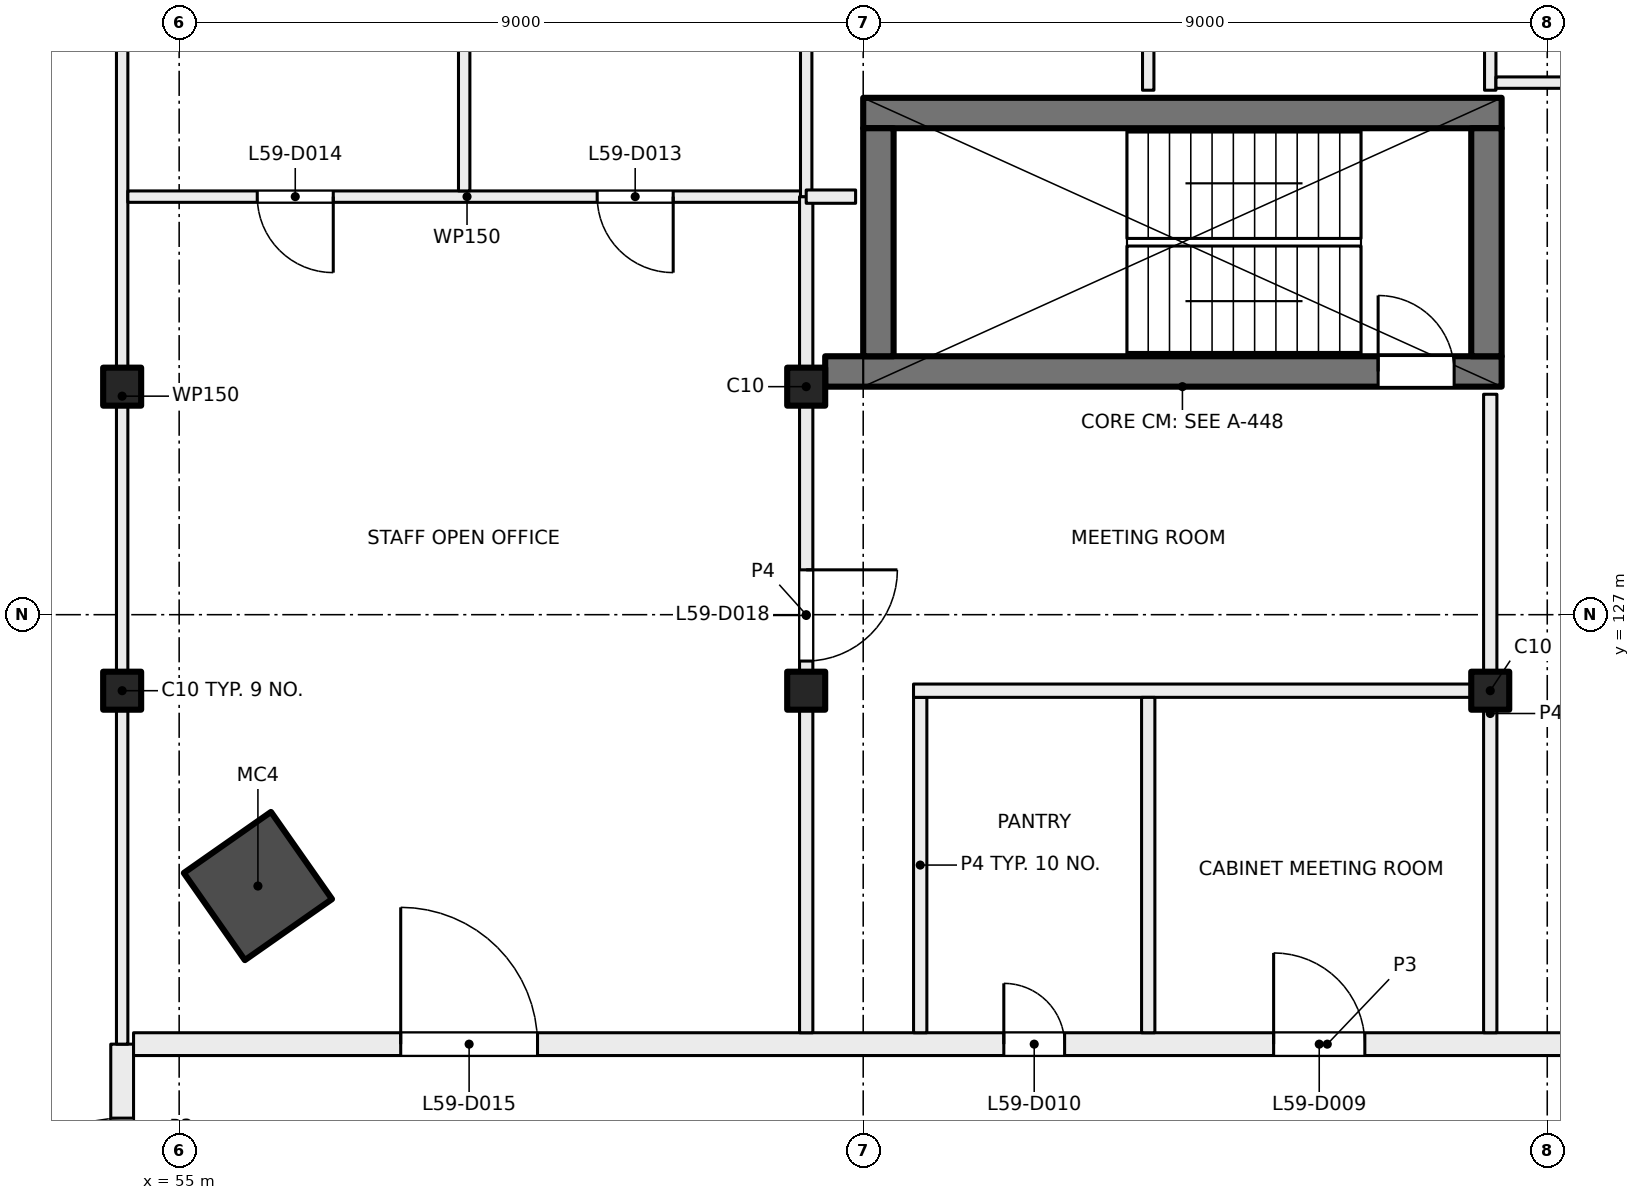
"""IFC4 building model, lengths in metres.
Left out: names, types, materials, properties, quantities, classifications, styles, units other than length and angle.
Written with IfcOpenShell. Run it as: python <this file> out.ifc"""

import sys

from ifc_helpers import new_model, si_unit, direction, frame, frame_2d, origin, origin_2d, place, context, subcontext, project, spatial, rectangle, hollow_rectangle, extrude, element, fill, save


model = new_model("IFC4")
c1 = context("Model", 3, precision=1e-05, world=origin(), true_north=direction((0.0, 1.0)))
c2 = subcontext(c1, "Body", "Model", "MODEL_VIEW")
j1 = project(units=[si_unit("LENGTHUNIT", "METRE"), si_unit("PLANEANGLEUNIT", "RADIAN")], contexts=[c1])
p1 = place(None, origin())
s1 = spatial("IfcSite", under=j1, at=p1, CompositionType="ELEMENT")
p2 = place(p1, origin())
s2 = spatial("IfcBuilding", under=s1, at=p2, CompositionType="ELEMENT")
p3 = place(p2, frame((0.0, 0.0, 249.5)))
s3 = spatial("IfcBuildingStorey", under=s2, at=p3, CompositionType="ELEMENT", Elevation=249.5)
p4 = place(p3, frame((56.036, 123.43, 0.0), z_axis=(0.0, 0.0, 1.0), x_axis=(0.573576436351, -0.819152044289, 0.0)))
e1 = element("IfcColumn", 1, at=p4, inside=s3, PredefinedType="COLUMN", context=c2, shape_type="SweptSolid", body=[
    extrude(hollow_rectangle(XDim=1.4, YDim=1.4, WallThickness=0.025, at=origin_2d()), origin(), (0.0, 0.0, 1.0), 4.0),
])
for number, where, z_axis, x_axis in (
    (2, (54.25, 130.0, 0.0), (0.0, 0.0, 1.0), (1.0, 0.0, 0.0)),
    (3, (63.25, 130.0, 0.0), (0.0, 0.0, 1.0), (1.0, 0.0, 0.0)),
    (4, (54.25, 126.0, 0.0), (0.0, 0.0, 1.0), (1.0, 0.0, 0.0)),
    (5, (63.25, 126.0, 0.0), (0.0, 0.0, 1.0), (1.0, 0.0, 0.0)),
    (6, (72.25, 126.0, 0.0), (0.0, 0.0, 1.0), (1.0, 0.0, 0.0)),
):
    element("IfcColumn", number, at=place(p3, frame(where, z_axis=z_axis, x_axis=x_axis)), inside=s3, PredefinedType="COLUMN", context=c2, shape_type="SweptSolid", body=[
        extrude(rectangle(XDim=0.5, YDim=0.5, at=origin_2d()), origin(), (0.0, 0.0, 1.0), 4.0),
    ])
p5 = place(p3, frame((63.5, 130.2, 0.0), z_axis=(0.0, 0.0, 1.0), x_axis=(1.0, 0.0, 0.0)))
e7 = element("IfcWall", 7, at=p5, inside=s3, PredefinedType="SHEAR", context=c2, shape_type="SweptSolid", body=[
    extrude(rectangle(XDim=8.9, YDim=0.4, at=frame_2d((4.45, 0.0))), origin(), (0.0, 0.0, 1.0), 4.0),
])
p6 = place(p5, frame((7.275, 0.0, 0.0)))
e8 = element("IfcOpeningElement", 8, at=p6, cuts=e7, PredefinedType="OPENING", context=c2, shape_type="SweptSolid", body=[
    extrude(rectangle(XDim=1.0, YDim=2.1, at=frame_2d((0.5, 1.05))), frame((0.0, 0.21, 0.0), z_axis=(0.0, -1.0, 0.0), x_axis=(1.0, 0.0, 0.0)), (0.0, 0.0, 1.0), 0.42),
])
p7 = place(p3, frame((64.0, 133.6, 0.0), z_axis=(0.0, 0.0, 1.0), x_axis=(1.0, 0.0, 0.0)))
e9 = element("IfcWall", 9, at=p7, inside=s3, PredefinedType="SHEAR", context=c2, shape_type="SweptSolid", body=[
    extrude(rectangle(XDim=8.4, YDim=0.4, at=frame_2d((4.2, 0.0))), origin(), (0.0, 0.0, 1.0), 4.0),
])
for number, where, z_axis, x_axis in (
    (10, (64.2, 130.4, 0.0), (0.0, 0.0, 1.0), (0.0, 1.0, 0.0)),
    (11, (72.2, 130.4, 0.0), (0.0, 0.0, 1.0), (0.0, 1.0, 0.0)),
):
    element("IfcWall", number, at=place(p3, frame(where, z_axis=z_axis, x_axis=x_axis)), inside=s3, PredefinedType="SHEAR", context=c2, shape_type="SweptSolid", body=[
        extrude(rectangle(XDim=3.0, YDim=0.4, at=frame_2d((1.5, 0.0))), origin(), (0.0, 0.0, 1.0), 4.0),
    ])
p8 = place(p3, frame((54.25, 117.6, 0.0), z_axis=(0.0, 0.0, 1.0), x_axis=(0.0, 1.0, 0.0)))
e12 = element("IfcWall", 12, at=p8, inside=s3, PredefinedType="PARTITIONING", context=c2, shape_type="SweptSolid", body=[
    extrude(rectangle(XDim=3.75, YDim=0.3, at=frame_2d((1.875, 0.0))), origin(), (0.0, 0.0, 1.0), 3.625),
])
p9 = place(p8, frame((0.977, 0.0, 0.0)))
e13 = element("IfcOpeningElement", 13, at=p9, cuts=e12, PredefinedType="OPENING", context=c2, shape_type="SweptSolid", body=[
    extrude(rectangle(XDim=1.8, YDim=2.1, at=frame_2d((0.9, 1.05))), frame((0.0, 0.16, 0.0), z_axis=(0.0, -1.0, 0.0), x_axis=(1.0, 0.0, 0.0)), (0.0, 0.0, 1.0), 0.32),
])
p10 = place(p3, frame((54.25, 121.35, 0.0), z_axis=(0.0, 0.0, 1.0), x_axis=(0.0, 1.0, 0.0)))
e14 = element("IfcWall", 14, at=p10, inside=s3, PredefinedType="PARTITIONING", context=c2, shape_type="SweptSolid", body=[
    extrude(rectangle(XDim=17.05, YDim=0.15, at=frame_2d((8.525, 0.0))), origin(), (0.0, 0.0, 1.0), 3.625),
])
p11 = place(p3, frame((54.4, 121.35, 0.0), z_axis=(0.0, 0.0, 1.0), x_axis=(1.0, 0.0, 0.0)))
e15 = element("IfcWall", 15, at=p11, inside=s3, PredefinedType="PARTITIONING", context=c2, shape_type="SweptSolid", body=[
    extrude(rectangle(XDim=31.412, YDim=0.3, at=frame_2d((15.706, 0.0))), origin(), (0.0, 0.0, 1.0), 3.625),
])
p12 = place(p11, frame((26.35, 0.0, 0.0)))
e16 = element("IfcOpeningElement", 16, at=p12, cuts=e15, PredefinedType="OPENING", context=c2, shape_type="SweptSolid", body=[
    extrude(rectangle(XDim=1.0, YDim=2.1, at=frame_2d((0.5, 1.05))), frame((0.0, 0.16, 0.0), z_axis=(0.0, -1.0, 0.0), x_axis=(1.0, 0.0, 0.0)), (0.0, 0.0, 1.0), 0.32),
])
p13 = place(p11, frame((19.2, 0.0, 0.0)))
e17 = element("IfcOpeningElement", 17, at=p13, cuts=e15, PredefinedType="OPENING", context=c2, shape_type="SweptSolid", body=[
    extrude(rectangle(XDim=1.8, YDim=2.1, at=frame_2d((0.9, 1.05))), frame((0.0, 0.16, 0.0), z_axis=(0.0, -1.0, 0.0), x_axis=(1.0, 0.0, 0.0)), (0.0, 0.0, 1.0), 0.32),
])
p14 = place(p11, frame((15.0, 0.0, 0.0)))
e18 = element("IfcOpeningElement", 18, at=p14, cuts=e15, PredefinedType="OPENING", context=c2, shape_type="SweptSolid", body=[
    extrude(rectangle(XDim=1.2, YDim=2.1, at=frame_2d((0.6, 1.05))), frame((0.0, 0.16, 0.0), z_axis=(0.0, -1.0, 0.0), x_axis=(1.0, 0.0, 0.0)), (0.0, 0.0, 1.0), 0.32),
])
p15 = place(p11, frame((11.45, 0.0, 0.0)))
e19 = element("IfcOpeningElement", 19, at=p15, cuts=e15, PredefinedType="OPENING", context=c2, shape_type="SweptSolid", body=[
    extrude(rectangle(XDim=0.8, YDim=2.1, at=frame_2d((0.4, 1.05))), frame((0.0, 0.16, 0.0), z_axis=(0.0, -1.0, 0.0), x_axis=(1.0, 0.0, 0.0)), (0.0, 0.0, 1.0), 0.32),
])
p16 = place(p11, frame((3.515, 0.0, 0.0)))
e20 = element("IfcOpeningElement", 20, at=p16, cuts=e15, PredefinedType="OPENING", context=c2, shape_type="SweptSolid", body=[
    extrude(rectangle(XDim=1.8, YDim=2.1, at=frame_2d((0.9, 1.05))), frame((0.0, 0.16, 0.0), z_axis=(0.0, -1.0, 0.0), x_axis=(1.0, 0.0, 0.0)), (0.0, 0.0, 1.0), 0.32),
])
p17 = place(p3, frame((63.25, 132.5, 0.0), z_axis=(0.0, 0.0, 1.0), x_axis=(-1.0, 0.0, 0.0)))
e21 = element("IfcWall", 21, at=p17, inside=s3, PredefinedType="PARTITIONING", context=c2, shape_type="SweptSolid", body=[
    extrude(rectangle(XDim=8.925, YDim=0.15, at=frame_2d((4.462, 0.0))), origin(), (0.0, 0.0, 1.0), 3.625),
])
p18 = place(p17, frame((1.75, 0.0, 0.0)))
e22 = element("IfcOpeningElement", 22, at=p18, cuts=e21, PredefinedType="OPENING", context=c2, shape_type="SweptSolid", body=[
    extrude(rectangle(XDim=1.0, YDim=2.1, at=frame_2d((0.5, 1.05))), frame((0.0, 0.085, 0.0), z_axis=(0.0, -1.0, 0.0), x_axis=(1.0, 0.0, 0.0)), (0.0, 0.0, 1.0), 0.17),
])
p19 = place(p17, frame((6.222, 0.0, 0.0)))
e23 = element("IfcOpeningElement", 23, at=p19, cuts=e21, PredefinedType="OPENING", context=c2, shape_type="SweptSolid", body=[
    extrude(rectangle(XDim=1.0, YDim=2.1, at=frame_2d((0.5, 1.05))), frame((0.0, 0.085, 0.0), z_axis=(0.0, -1.0, 0.0), x_axis=(1.0, 0.0, 0.0)), (0.0, 0.0, 1.0), 0.17),
])
p20 = place(p3, frame((58.75, 132.575, 0.0), z_axis=(0.0, 0.0, 1.0), x_axis=(0.0, 1.0, 0.0)))
e24 = element("IfcWall", 24, at=p20, inside=s3, PredefinedType="PARTITIONING", context=c2, shape_type="SweptSolid", body=[
    extrude(rectangle(XDim=5.825, YDim=0.15, at=frame_2d((2.913, 0.0))), origin(), (0.0, 0.0, 1.0), 3.625),
])
p21 = place(p3, frame((63.25, 132.5, 0.0), z_axis=(0.0, 0.0, 1.0), x_axis=(0.0, -1.0, 0.0)))
e25 = element("IfcWall", 25, at=p21, inside=s3, PredefinedType="PARTITIONING", context=c2, shape_type="SweptSolid", body=[
    extrude(rectangle(XDim=11.0, YDim=0.175, at=frame_2d((5.5, 0.0))), origin(), (0.0, 0.0, 1.0), 3.625),
])
p22 = place(p21, frame((4.91, 0.0, 0.0)))
e26 = element("IfcOpeningElement", 26, at=p22, cuts=e25, PredefinedType="OPENING", context=c2, shape_type="SweptSolid", body=[
    extrude(rectangle(XDim=1.2, YDim=2.1, at=frame_2d((0.6, 1.05))), frame((0.0, 0.097, 0.0), z_axis=(0.0, -1.0, 0.0), x_axis=(1.0, 0.0, 0.0)), (0.0, 0.0, 1.0), 0.195),
])
p23 = place(p3, frame((63.25, 132.5, 0.0), z_axis=(0.0, 0.0, 1.0), x_axis=(0.0, 1.0, 0.0)))
e27 = element("IfcWall", 27, at=p23, inside=s3, PredefinedType="PARTITIONING", context=c2, shape_type="SweptSolid", body=[
    extrude(rectangle(XDim=5.9, YDim=0.15, at=frame_2d((2.95, 0.0))), origin(), (0.0, 0.0, 1.0), 3.625),
])
p24 = place(p23, frame((2.45, 0.0, 0.0)))
e28 = element("IfcOpeningElement", 28, at=p24, cuts=e27, PredefinedType="OPENING", context=c2, shape_type="SweptSolid", body=[
    extrude(rectangle(XDim=1.0, YDim=2.1, at=frame_2d((0.5, 1.05))), frame((0.0, 0.085, 0.0), z_axis=(0.0, -1.0, 0.0), x_axis=(1.0, 0.0, 0.0)), (0.0, 0.0, 1.0), 0.17),
])
p25 = place(p3, frame((63.9, 132.5, 0.0), z_axis=(0.0, 0.0, 1.0), x_axis=(-1.0, 0.0, 0.0)))
e29 = element("IfcWall", 29, at=p25, inside=s3, PredefinedType="PARTITIONING", context=c2, shape_type="SweptSolid", body=[
    extrude(rectangle(XDim=0.65, YDim=0.175, at=frame_2d((0.325, 0.0))), origin(), (0.0, 0.0, 1.0), 3.625),
])
p26 = place(p3, frame((64.75, 125.912, 0.0), z_axis=(0.0, 0.0, 1.0), x_axis=(0.0, -1.0, 0.0)))
e30 = element("IfcWall", 30, at=p26, inside=s3, PredefinedType="PARTITIONING", context=c2, shape_type="SweptSolid", body=[
    extrude(rectangle(XDim=4.412, YDim=0.175, at=frame_2d((2.206, 0.0))), origin(), (0.0, 0.0, 1.0), 3.625),
])
p27 = place(p3, frame((64.662, 126.0, 0.0), z_axis=(0.0, 0.0, 1.0), x_axis=(1.0, 0.0, 0.0)))
e31 = element("IfcWall", 31, at=p27, inside=s3, PredefinedType="PARTITIONING", context=c2, shape_type="SweptSolid", body=[
    extrude(rectangle(XDim=7.5, YDim=0.175, at=frame_2d((3.75, 0.0))), origin(), (0.0, 0.0, 1.0), 3.625),
])
p28 = place(p3, frame((67.75, 121.5, 0.0), z_axis=(0.0, 0.0, 1.0), x_axis=(0.0, 1.0, 0.0)))
e32 = element("IfcWall", 32, at=p28, inside=s3, PredefinedType="PARTITIONING", context=c2, shape_type="SweptSolid", body=[
    extrude(rectangle(XDim=4.412, YDim=0.175, at=frame_2d((2.206, 0.0))), origin(), (0.0, 0.0, 1.0), 3.625),
])
p29 = place(p3, frame((67.75, 133.9, 0.0), z_axis=(0.0, 0.0, 1.0), x_axis=(0.0, 1.0, 0.0)))
e33 = element("IfcWall", 33, at=p29, inside=s3, PredefinedType="PARTITIONING", context=c2, shape_type="SweptSolid", body=[
    extrude(rectangle(XDim=4.5, YDim=0.15, at=frame_2d((2.25, 0.0))), origin(), (0.0, 0.0, 1.0), 3.625),
])
p30 = place(p29, frame((1.75, 0.0, 0.0)))
e34 = element("IfcOpeningElement", 34, at=p30, cuts=e33, PredefinedType="OPENING", context=c2, shape_type="SweptSolid", body=[
    extrude(rectangle(XDim=1.0, YDim=2.1, at=frame_2d((0.5, 1.05))), frame((0.0, 0.085, 0.0), z_axis=(0.0, -1.0, 0.0), x_axis=(1.0, 0.0, 0.0)), (0.0, 0.0, 1.0), 0.17),
])
p31 = place(p3, frame((72.25, 121.5, 0.0), z_axis=(0.0, 0.0, 1.0), x_axis=(0.0, 1.0, 0.0)))
e35 = element("IfcWall", 35, at=p31, inside=s3, PredefinedType="PARTITIONING", context=c2, shape_type="SweptSolid", body=[
    extrude(rectangle(XDim=8.4, YDim=0.175, at=frame_2d((4.2, 0.0))), origin(), (0.0, 0.0, 1.0), 3.625),
])
p32 = place(p3, frame((72.25, 133.9, 0.0), z_axis=(0.0, 0.0, 1.0), x_axis=(0.0, 1.0, 0.0)))
e36 = element("IfcWall", 36, at=p32, inside=s3, PredefinedType="PARTITIONING", context=c2, shape_type="SweptSolid", body=[
    extrude(rectangle(XDim=4.5, YDim=0.15, at=frame_2d((2.25, 0.0))), origin(), (0.0, 0.0, 1.0), 3.625),
])
p33 = place(p3, frame((81.162, 134.0, 0.0), z_axis=(0.0, 0.0, 1.0), x_axis=(-1.0, 0.0, 0.0)))
e37 = element("IfcWall", 37, at=p33, inside=s3, PredefinedType="PARTITIONING", context=c2, shape_type="SweptSolid", body=[
    extrude(rectangle(XDim=8.837, YDim=0.15, at=frame_2d((4.418, 0.0))), origin(), (0.0, 0.0, 1.0), 3.625),
])
p34 = place(p33, frame((1.696, 0.0, 0.0)))
e38 = element("IfcOpeningElement", 38, at=p34, cuts=e37, PredefinedType="OPENING", context=c2, shape_type="SweptSolid", body=[
    extrude(rectangle(XDim=1.0, YDim=2.1, at=frame_2d((0.5, 1.05))), frame((0.0, 0.085, 0.0), z_axis=(0.0, -1.0, 0.0), x_axis=(1.0, 0.0, 0.0)), (0.0, 0.0, 1.0), 0.17),
])
p35 = place(p33, frame((6.135, 0.0, 0.0)))
e39 = element("IfcOpeningElement", 39, at=p35, cuts=e37, PredefinedType="OPENING", context=c2, shape_type="SweptSolid", body=[
    extrude(rectangle(XDim=1.0, YDim=2.1, at=frame_2d((0.5, 1.05))), frame((0.0, 0.085, 0.0), z_axis=(0.0, -1.0, 0.0), x_axis=(1.0, 0.0, 0.0)), (0.0, 0.0, 1.0), 0.17),
])
p36 = place(p6, origin())
e40 = element("IfcDoor", 40, at=p36, inside=s3, OperationType="SINGLE_SWING_LEFT", PredefinedType="DOOR", context=c2, shape_type="SweptSolid", body=[
    extrude(rectangle(XDim=1.0, YDim=2.1, at=frame_2d((0.5, 1.05))), frame((0.0, 0.025, 0.0), z_axis=(0.0, -1.0, 0.0), x_axis=(1.0, 0.0, 0.0)), (0.0, 0.0, 1.0), 0.05),
])
fill(e8, e40)
p37 = place(p14, origin())
e41 = element("IfcDoor", 41, at=p37, inside=s3, OperationType="DOUBLE_DOOR_SINGLE_SWING", PredefinedType="DOOR", context=c2, shape_type="SweptSolid", body=[
    extrude(rectangle(XDim=1.2, YDim=2.1, at=frame_2d((0.6, 1.05))), frame((0.0, 0.025, 0.0), z_axis=(0.0, -1.0, 0.0), x_axis=(1.0, 0.0, 0.0)), (0.0, 0.0, 1.0), 0.05),
])
fill(e18, e41)
p38 = place(p15, origin())
e42 = element("IfcDoor", 42, at=p38, inside=s3, OperationType="SINGLE_SWING_LEFT", PredefinedType="DOOR", context=c2, shape_type="SweptSolid", body=[
    extrude(rectangle(XDim=0.8, YDim=2.1, at=frame_2d((0.4, 1.05))), frame((0.0, 0.025, 0.0), z_axis=(0.0, -1.0, 0.0), x_axis=(1.0, 0.0, 0.0)), (0.0, 0.0, 1.0), 0.05),
])
fill(e19, e42)
p39 = place(p18, origin())
e43 = element("IfcDoor", 43, at=p39, inside=s3, OperationType="SINGLE_SWING_LEFT", PredefinedType="DOOR", context=c2, shape_type="SweptSolid", body=[
    extrude(rectangle(XDim=1.0, YDim=2.1, at=frame_2d((0.5, 1.05))), frame((0.0, 0.025, 0.0), z_axis=(0.0, -1.0, 0.0), x_axis=(1.0, 0.0, 0.0)), (0.0, 0.0, 1.0), 0.05),
])
fill(e22, e43)
p40 = place(p19, origin())
e44 = element("IfcDoor", 44, at=p40, inside=s3, OperationType="SINGLE_SWING_RIGHT", PredefinedType="DOOR", context=c2, shape_type="SweptSolid", body=[
    extrude(rectangle(XDim=1.0, YDim=2.1, at=frame_2d((0.5, 1.05))), frame((0.0, 0.025, 0.0), z_axis=(0.0, -1.0, 0.0), x_axis=(1.0, 0.0, 0.0)), (0.0, 0.0, 1.0), 0.05),
])
fill(e23, e44)
p41 = place(p16, origin())
e45 = element("IfcDoor", 45, at=p41, inside=s3, OperationType="DOUBLE_DOOR_SINGLE_SWING", PredefinedType="DOOR", context=c2, shape_type="SweptSolid", body=[
    extrude(rectangle(XDim=1.8, YDim=2.1, at=frame_2d((0.9, 1.05))), frame((0.0, 0.025, 0.0), z_axis=(0.0, -1.0, 0.0), x_axis=(1.0, 0.0, 0.0)), (0.0, 0.0, 1.0), 0.05),
])
fill(e20, e45)
p42 = place(p9, origin())
e46 = element("IfcDoor", 46, at=p42, inside=s3, OperationType="DOUBLE_DOOR_SINGLE_SWING", PredefinedType="DOOR", context=c2, shape_type="SweptSolid", body=[
    extrude(rectangle(XDim=1.8, YDim=2.1, at=frame_2d((0.9, 1.05))), frame((0.0, 0.025, 0.0), z_axis=(0.0, -1.0, 0.0), x_axis=(1.0, 0.0, 0.0)), (0.0, 0.0, 1.0), 0.05),
])
fill(e13, e46)
p43 = place(p22, origin())
e47 = element("IfcDoor", 47, at=p43, inside=s3, OperationType="DOUBLE_DOOR_SINGLE_SWING", PredefinedType="DOOR", context=c2, shape_type="SweptSolid", body=[
    extrude(rectangle(XDim=1.2, YDim=2.1, at=frame_2d((0.6, 1.05))), frame((0.0, 0.025, 0.0), z_axis=(0.0, -1.0, 0.0), x_axis=(1.0, 0.0, 0.0)), (0.0, 0.0, 1.0), 0.05),
])
fill(e26, e47)
save(model, sys.argv[1])
